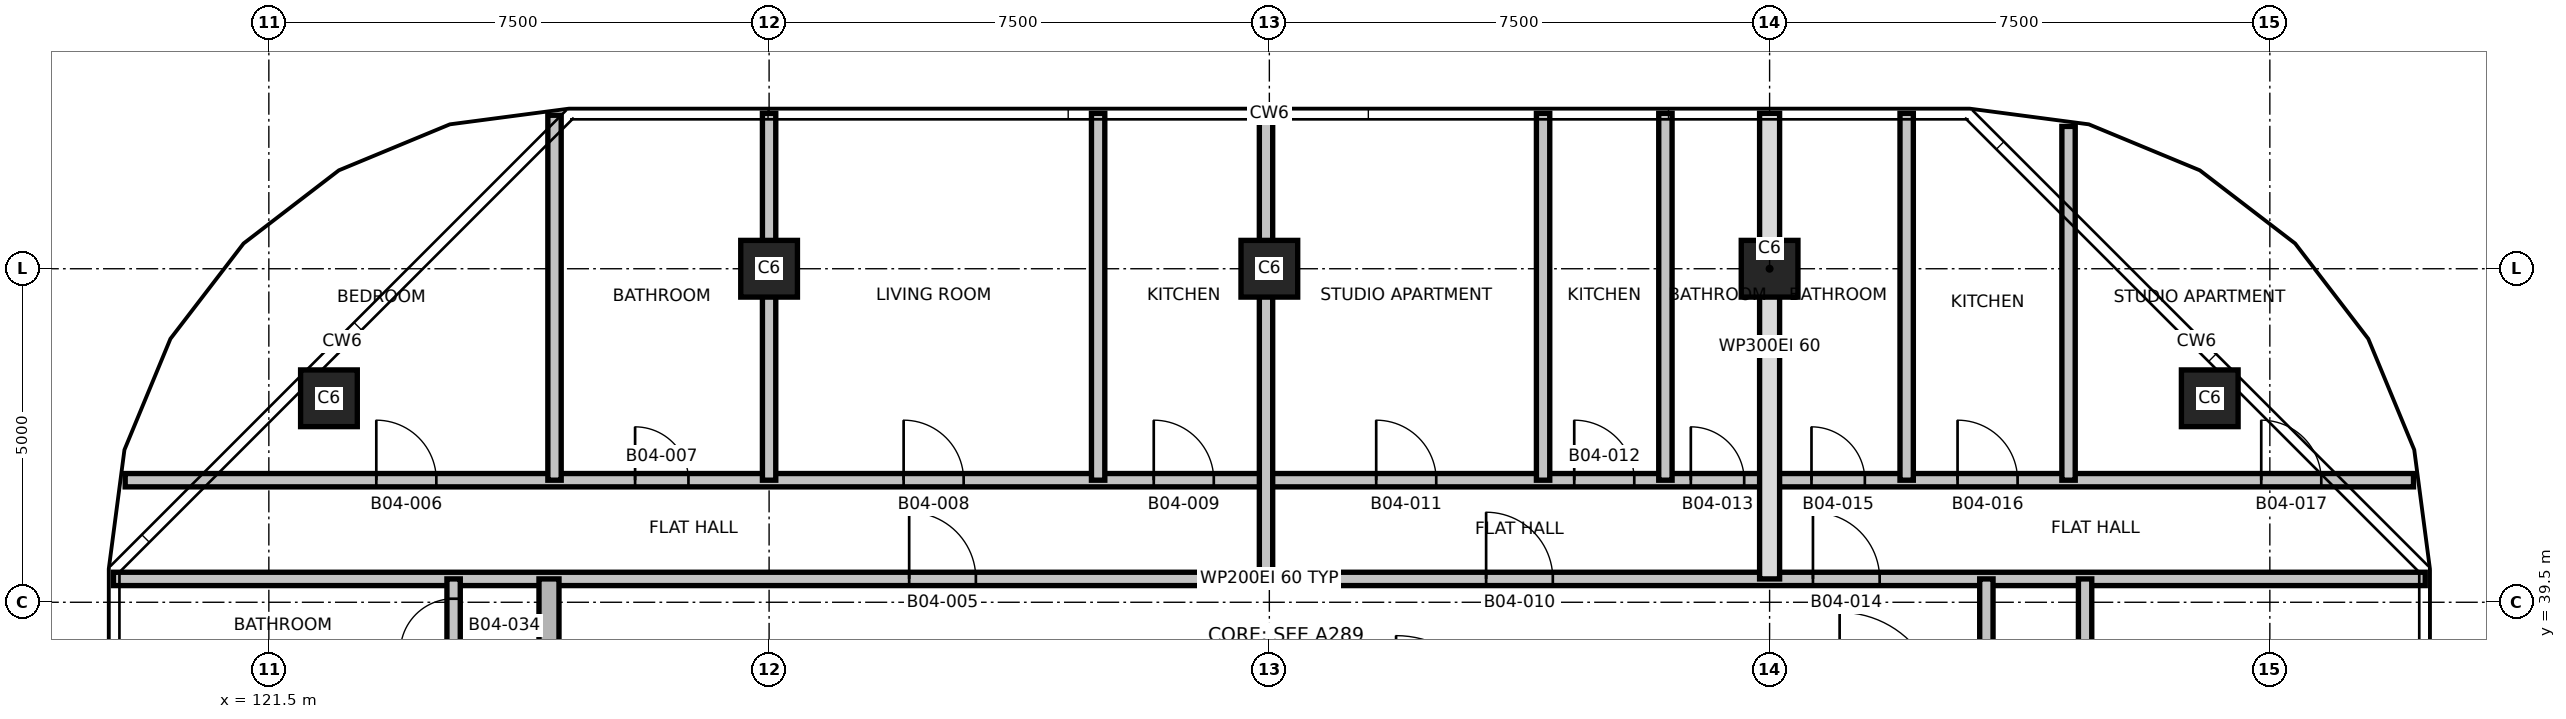
"""IFC4 building model, lengths in metres.
Left out: names, types, materials, properties, quantities, classifications, styles, units other than length and angle.
Written with IfcOpenShell. Run it as: python <this file> out.ifc"""

import sys

from ifc_helpers import new_model, si_unit, direction, frame, frame_2d, origin, origin_2d, place, context, subcontext, project, spatial, rectangle, extrude, element, fill, save


model = new_model("IFC4")
c1 = context("Model", 3, precision=1e-05, world=origin(), true_north=direction((0.0, 1.0)))
c2 = subcontext(c1, "Body", "Model", "MODEL_VIEW")
j1 = project(units=[si_unit("LENGTHUNIT", "METRE"), si_unit("PLANEANGLEUNIT", "RADIAN")], contexts=[c1])
p1 = place(None, origin())
s1 = spatial("IfcSite", under=j1, at=p1, CompositionType="ELEMENT")
p2 = place(p1, origin())
s2 = spatial("IfcBuilding", under=s1, at=p2, CompositionType="ELEMENT")
p3 = place(p2, frame((0.0, 0.0, 66.8)))
s3 = spatial("IfcBuildingStorey", under=s2, at=p3, CompositionType="ELEMENT", Elevation=66.8)
for number, where, z_axis, x_axis in (
    (1, (122.401, 42.558, 0.0), (0.0, 0.0, 1.0), (1.0, 0.0, 0.0)),
    (2, (150.599, 42.558, 0.0), (0.0, 0.0, 1.0), (1.0, 0.0, 0.0)),
    (3, (129.0, 44.5, 0.0), (0.0, 0.0, 1.0), (1.0, 0.0, 0.0)),
    (4, (136.5, 44.5, 0.0), (0.0, 0.0, 1.0), (1.0, 0.0, 0.0)),
    (5, (144.0, 44.5, 0.0), (0.0, 0.0, 1.0), (1.0, 0.0, 0.0)),
):
    element("IfcColumn", number, at=place(p3, frame(where, z_axis=z_axis, x_axis=x_axis)), inside=s3, PredefinedType="COLUMN", context=c2, shape_type="SweptSolid", body=[
        extrude(rectangle(XDim=0.85, YDim=0.85, at=origin_2d()), origin(), (0.0, 0.0, 1.0), 3.7),
    ])
p4 = place(p3, frame((119.17, 39.85, 0.0), z_axis=(0.0, 0.0, 1.0), x_axis=(1.0, 0.0, 0.0)))
e6 = element("IfcWall", 6, at=p4, inside=s3, PredefinedType="PARTITIONING", context=c2, shape_type="SweptSolid", body=[
    extrude(rectangle(XDim=34.66, YDim=0.2, at=frame_2d((17.33, 0.0))), origin(), (0.0, 0.0, 1.0), 3.4),
])
p5 = place(p4, frame((11.93, 0.0, 0.0)))
e7 = element("IfcOpeningElement", 7, at=p5, cuts=e6, PredefinedType="OPENING", context=c2, shape_type="SweptSolid", body=[
    extrude(rectangle(XDim=1.0, YDim=2.1, at=frame_2d((0.5, 1.05))), frame((0.0, 0.11, 0.0), z_axis=(0.0, -1.0, 0.0), x_axis=(1.0, 0.0, 0.0)), (0.0, 0.0, 1.0), 0.22),
])
p6 = place(p4, frame((20.58, 0.0, 0.0)))
e8 = element("IfcOpeningElement", 8, at=p6, cuts=e6, PredefinedType="OPENING", context=c2, shape_type="SweptSolid", body=[
    extrude(rectangle(XDim=1.0, YDim=2.1, at=frame_2d((0.5, 1.05))), frame((0.0, 0.11, 0.0), z_axis=(0.0, -1.0, 0.0), x_axis=(1.0, 0.0, 0.0)), (0.0, 0.0, 1.0), 0.22),
])
p7 = place(p4, frame((25.48, 0.0, 0.0)))
e9 = element("IfcOpeningElement", 9, at=p7, cuts=e6, PredefinedType="OPENING", context=c2, shape_type="SweptSolid", body=[
    extrude(rectangle(XDim=1.0, YDim=2.1, at=frame_2d((0.5, 1.05))), frame((0.0, 0.11, 0.0), z_axis=(0.0, -1.0, 0.0), x_axis=(1.0, 0.0, 0.0)), (0.0, 0.0, 1.0), 0.22),
])
p8 = place(p3, frame((119.346, 41.33, 0.0), z_axis=(0.0, 0.0, 1.0), x_axis=(1.0, 0.0, 0.0)))
e10 = element("IfcWall", 10, at=p8, inside=s3, PredefinedType="PARTITIONING", context=c2, shape_type="SweptSolid", body=[
    extrude(rectangle(XDim=34.308, YDim=0.2, at=frame_2d((17.154, 0.0))), origin(), (0.0, 0.0, 1.0), 3.4),
])
p9 = place(p8, frame((3.765, 0.0, 0.0)))
e11 = element("IfcOpeningElement", 11, at=p9, cuts=e10, PredefinedType="OPENING", context=c2, shape_type="SweptSolid", body=[
    extrude(rectangle(XDim=0.9, YDim=2.1, at=frame_2d((0.45, 1.05))), frame((0.0, 0.11, 0.0), z_axis=(0.0, -1.0, 0.0), x_axis=(1.0, 0.0, 0.0)), (0.0, 0.0, 1.0), 0.22),
])
p10 = place(p8, frame((7.645, 0.0, 0.0)))
e12 = element("IfcOpeningElement", 12, at=p10, cuts=e10, PredefinedType="OPENING", context=c2, shape_type="SweptSolid", body=[
    extrude(rectangle(XDim=0.8, YDim=2.1, at=frame_2d((0.4, 1.05))), frame((0.0, 0.11, 0.0), z_axis=(0.0, -1.0, 0.0), x_axis=(1.0, 0.0, 0.0)), (0.0, 0.0, 1.0), 0.22),
])
p11 = place(p8, frame((11.671, 0.0, 0.0)))
e13 = element("IfcOpeningElement", 13, at=p11, cuts=e10, PredefinedType="OPENING", context=c2, shape_type="SweptSolid", body=[
    extrude(rectangle(XDim=0.9, YDim=2.1, at=frame_2d((0.45, 1.05))), frame((0.0, 0.11, 0.0), z_axis=(0.0, -1.0, 0.0), x_axis=(1.0, 0.0, 0.0)), (0.0, 0.0, 1.0), 0.22),
])
p12 = place(p8, frame((15.421, 0.0, 0.0)))
e14 = element("IfcOpeningElement", 14, at=p12, cuts=e10, PredefinedType="OPENING", context=c2, shape_type="SweptSolid", body=[
    extrude(rectangle(XDim=0.9, YDim=2.1, at=frame_2d((0.45, 1.05))), frame((0.0, 0.11, 0.0), z_axis=(0.0, -1.0, 0.0), x_axis=(1.0, 0.0, 0.0)), (0.0, 0.0, 1.0), 0.22),
])
p13 = place(p8, frame((18.756, 0.0, 0.0)))
e15 = element("IfcOpeningElement", 15, at=p13, cuts=e10, PredefinedType="OPENING", context=c2, shape_type="SweptSolid", body=[
    extrude(rectangle(XDim=0.9, YDim=2.1, at=frame_2d((0.45, 1.05))), frame((0.0, 0.11, 0.0), z_axis=(0.0, -1.0, 0.0), x_axis=(1.0, 0.0, 0.0)), (0.0, 0.0, 1.0), 0.22),
])
p14 = place(p8, frame((21.725, 0.0, 0.0)))
e16 = element("IfcOpeningElement", 16, at=p14, cuts=e10, PredefinedType="OPENING", context=c2, shape_type="SweptSolid", body=[
    extrude(rectangle(XDim=0.9, YDim=2.1, at=frame_2d((0.45, 1.05))), frame((0.0, 0.11, 0.0), z_axis=(0.0, -1.0, 0.0), x_axis=(1.0, 0.0, 0.0)), (0.0, 0.0, 1.0), 0.22),
])
p15 = place(p8, frame((23.473, 0.0, 0.0)))
e17 = element("IfcOpeningElement", 17, at=p15, cuts=e10, PredefinedType="OPENING", context=c2, shape_type="SweptSolid", body=[
    extrude(rectangle(XDim=0.8, YDim=2.1, at=frame_2d((0.4, 1.05))), frame((0.0, 0.11, 0.0), z_axis=(0.0, -1.0, 0.0), x_axis=(1.0, 0.0, 0.0)), (0.0, 0.0, 1.0), 0.22),
])
p16 = place(p8, frame((25.282, 0.0, 0.0)))
e18 = element("IfcOpeningElement", 18, at=p16, cuts=e10, PredefinedType="OPENING", context=c2, shape_type="SweptSolid", body=[
    extrude(rectangle(XDim=0.8, YDim=2.1, at=frame_2d((0.4, 1.05))), frame((0.0, 0.11, 0.0), z_axis=(0.0, -1.0, 0.0), x_axis=(1.0, 0.0, 0.0)), (0.0, 0.0, 1.0), 0.22),
])
p17 = place(p8, frame((27.472, 0.0, 0.0)))
e19 = element("IfcOpeningElement", 19, at=p17, cuts=e10, PredefinedType="OPENING", context=c2, shape_type="SweptSolid", body=[
    extrude(rectangle(XDim=0.9, YDim=2.1, at=frame_2d((0.45, 1.05))), frame((0.0, 0.11, 0.0), z_axis=(0.0, -1.0, 0.0), x_axis=(1.0, 0.0, 0.0)), (0.0, 0.0, 1.0), 0.22),
])
p18 = place(p8, frame((32.025, 0.0, 0.0)))
e20 = element("IfcOpeningElement", 20, at=p18, cuts=e10, PredefinedType="OPENING", context=c2, shape_type="SweptSolid", body=[
    extrude(rectangle(XDim=0.9, YDim=2.1, at=frame_2d((0.45, 1.05))), frame((0.0, 0.11, 0.0), z_axis=(0.0, -1.0, 0.0), x_axis=(1.0, 0.0, 0.0)), (0.0, 0.0, 1.0), 0.22),
])
p19 = place(p3, frame((124.27, 22.15, 0.0), z_axis=(0.0, 0.0, 1.0), x_axis=(0.0, 1.0, 0.0)))
e21 = element("IfcWall", 21, at=p19, inside=s3, PredefinedType="PARTITIONING", context=c2, shape_type="SweptSolid", body=[
    extrude(rectangle(XDim=17.7, YDim=0.2, at=frame_2d((8.85, 0.0))), origin(), (0.0, 0.0, 1.0), 3.4),
])
p20 = place(p19, frame((1.725, 0.0, 0.0)))
e22 = element("IfcOpeningElement", 22, at=p20, cuts=e21, PredefinedType="OPENING", context=c2, shape_type="SweptSolid", body=[
    extrude(rectangle(XDim=0.9, YDim=2.1, at=frame_2d((0.45, 1.05))), frame((0.0, 0.11, 0.0), z_axis=(0.0, -1.0, 0.0), x_axis=(1.0, 0.0, 0.0)), (0.0, 0.0, 1.0), 0.22),
])
p21 = place(p19, frame((6.867, 0.0, 0.0)))
e23 = element("IfcOpeningElement", 23, at=p21, cuts=e21, PredefinedType="OPENING", context=c2, shape_type="SweptSolid", body=[
    extrude(rectangle(XDim=0.9, YDim=2.1, at=frame_2d((0.45, 1.05))), frame((0.0, 0.11, 0.0), z_axis=(0.0, -1.0, 0.0), x_axis=(1.0, 0.0, 0.0)), (0.0, 0.0, 1.0), 0.22),
])
p22 = place(p19, frame((11.367, 0.0, 0.0)))
e24 = element("IfcOpeningElement", 24, at=p22, cuts=e21, PredefinedType="OPENING", context=c2, shape_type="SweptSolid", body=[
    extrude(rectangle(XDim=0.9, YDim=2.1, at=frame_2d((0.45, 1.05))), frame((0.0, 0.11, 0.0), z_axis=(0.0, -1.0, 0.0), x_axis=(1.0, 0.0, 0.0)), (0.0, 0.0, 1.0), 0.22),
])
p23 = place(p19, frame((14.378, 0.0, 0.0)))
e25 = element("IfcOpeningElement", 25, at=p23, cuts=e21, PredefinedType="OPENING", context=c2, shape_type="SweptSolid", body=[
    extrude(rectangle(XDim=0.9, YDim=2.1, at=frame_2d((0.45, 1.05))), frame((0.0, 0.11, 0.0), z_axis=(0.0, -1.0, 0.0), x_axis=(1.0, 0.0, 0.0)), (0.0, 0.0, 1.0), 0.22),
])
p24 = place(p19, frame((16.603, 0.0, 0.0)))
e26 = element("IfcOpeningElement", 26, at=p24, cuts=e21, PredefinedType="OPENING", context=c2, shape_type="SweptSolid", body=[
    extrude(rectangle(XDim=0.8, YDim=2.1, at=frame_2d((0.4, 1.05))), frame((0.0, 0.11, 0.0), z_axis=(0.0, -1.0, 0.0), x_axis=(1.0, 0.0, 0.0)), (0.0, 0.0, 1.0), 0.22),
])
p25 = place(p3, frame((125.7, 22.15, 0.0), z_axis=(0.0, 0.0, 1.0), x_axis=(0.0, 1.0, 0.0)))
e27 = element("IfcWall", 27, at=p25, inside=s3, PredefinedType="SHEAR", context=c2, shape_type="SweptSolid", body=[
    extrude(rectangle(XDim=17.7, YDim=0.3, at=frame_2d((8.85, 0.0))), origin(), (0.0, 0.0, 1.0), 3.4),
])
p26 = place(p25, frame((2.7, 0.0, 0.0)))
e28 = element("IfcOpeningElement", 28, at=p26, cuts=e27, PredefinedType="OPENING", context=c2, shape_type="SweptSolid", body=[
    extrude(rectangle(XDim=1.0, YDim=2.1, at=frame_2d((0.5, 1.05))), frame((0.0, 0.16, 0.0), z_axis=(0.0, -1.0, 0.0), x_axis=(1.0, 0.0, 0.0)), (0.0, 0.0, 1.0), 0.32),
])
p27 = place(p3, frame((125.783, 41.33, 0.0), z_axis=(0.0, 0.0, 1.0), x_axis=(0.0, 1.0, 0.0)))
e29 = element("IfcWall", 29, at=p27, inside=s3, PredefinedType="PARTITIONING", context=c2, shape_type="SweptSolid", body=[
    extrude(rectangle(XDim=5.471, YDim=0.2, at=frame_2d((2.735, 0.0))), origin(), (0.0, 0.0, 1.0), 3.4),
])
for number, where, z_axis, x_axis in (
    (30, (129.0, 41.33, 0.0), (0.0, 0.0, 1.0), (0.0, 1.0, 0.0)),
    (31, (133.933, 41.33, 0.0), (0.0, 0.0, 1.0), (0.0, 1.0, 0.0)),
):
    element("IfcWall", number, at=place(p3, frame(where, z_axis=z_axis, x_axis=x_axis)), inside=s3, PredefinedType="PARTITIONING", context=c2, shape_type="SweptSolid", body=[
        extrude(rectangle(XDim=5.5, YDim=0.2, at=frame_2d((2.75, 0.0))), origin(), (0.0, 0.0, 1.0), 3.4),
    ])
p28 = place(p3, frame((136.45, 39.85, 0.0), z_axis=(0.0, 0.0, 1.0), x_axis=(0.0, 1.0, 0.0)))
e32 = element("IfcWall", 32, at=p28, inside=s3, PredefinedType="PARTITIONING", context=c2, shape_type="SweptSolid", body=[
    extrude(rectangle(XDim=6.98, YDim=0.2, at=frame_2d((3.49, 0.0))), origin(), (0.0, 0.0, 1.0), 3.4),
])
for number, where, z_axis, x_axis in (
    (33, (140.604, 41.33, 0.0), (0.0, 0.0, 1.0), (0.0, 1.0, 0.0)),
    (34, (142.438, 41.33, 0.0), (0.0, 0.0, 1.0), (0.0, 1.0, 0.0)),
):
    element("IfcWall", number, at=place(p3, frame(where, z_axis=z_axis, x_axis=x_axis)), inside=s3, PredefinedType="PARTITIONING", context=c2, shape_type="SweptSolid", body=[
        extrude(rectangle(XDim=5.5, YDim=0.2, at=frame_2d((2.75, 0.0))), origin(), (0.0, 0.0, 1.0), 3.4),
    ])
p29 = place(p3, frame((144.0, 39.85, 0.0), z_axis=(0.0, 0.0, 1.0), x_axis=(0.0, 1.0, 0.0)))
e35 = element("IfcWall", 35, at=p29, inside=s3, PredefinedType="PARTITIONING", context=c2, shape_type="SweptSolid", body=[
    extrude(rectangle(XDim=6.98, YDim=0.3, at=frame_2d((3.49, 0.0))), origin(), (0.0, 0.0, 1.0), 3.4),
])
p30 = place(p3, frame((146.055, 41.33, 0.0), z_axis=(0.0, 0.0, 1.0), x_axis=(0.0, 1.0, 0.0)))
e36 = element("IfcWall", 36, at=p30, inside=s3, PredefinedType="PARTITIONING", context=c2, shape_type="SweptSolid", body=[
    extrude(rectangle(XDim=5.5, YDim=0.2, at=frame_2d((2.75, 0.0))), origin(), (0.0, 0.0, 1.0), 3.4),
])
p31 = place(p3, frame((147.25, 22.15, 0.0), z_axis=(0.0, 0.0, 1.0), x_axis=(0.0, 1.0, 0.0)))
e37 = element("IfcWall", 37, at=p31, inside=s3, PredefinedType="PARTITIONING", context=c2, shape_type="SweptSolid", body=[
    extrude(rectangle(XDim=17.7, YDim=0.2, at=frame_2d((8.85, 0.0))), origin(), (0.0, 0.0, 1.0), 3.4),
])
p32 = place(p31, frame((2.65, 0.0, 0.0)))
e38 = element("IfcOpeningElement", 38, at=p32, cuts=e37, PredefinedType="OPENING", context=c2, shape_type="SweptSolid", body=[
    extrude(rectangle(XDim=1.0, YDim=2.1, at=frame_2d((0.5, 1.05))), frame((0.0, 0.11, 0.0), z_axis=(0.0, -1.0, 0.0), x_axis=(1.0, 0.0, 0.0)), (0.0, 0.0, 1.0), 0.22),
])
p33 = place(p3, frame((148.482, 41.33, 0.0), z_axis=(0.0, 0.0, 1.0), x_axis=(0.0, 1.0, 0.0)))
e39 = element("IfcWall", 39, at=p33, inside=s3, PredefinedType="PARTITIONING", context=c2, shape_type="SweptSolid", body=[
    extrude(rectangle(XDim=5.304, YDim=0.2, at=frame_2d((2.652, 0.0))), origin(), (0.0, 0.0, 1.0), 3.4),
])
p34 = place(p3, frame((148.73, 22.15, 0.0), z_axis=(0.0, 0.0, 1.0), x_axis=(0.0, 1.0, 0.0)))
e40 = element("IfcWall", 40, at=p34, inside=s3, PredefinedType="PARTITIONING", context=c2, shape_type="SweptSolid", body=[
    extrude(rectangle(XDim=17.7, YDim=0.2, at=frame_2d((8.85, 0.0))), origin(), (0.0, 0.0, 1.0), 3.4),
])
p35 = place(p34, frame((1.028, 0.0, 0.0)))
e41 = element("IfcOpeningElement", 41, at=p35, cuts=e40, PredefinedType="OPENING", context=c2, shape_type="SweptSolid", body=[
    extrude(rectangle(XDim=0.9, YDim=2.1, at=frame_2d((0.45, 1.05))), frame((0.0, 0.11, 0.0), z_axis=(0.0, -1.0, 0.0), x_axis=(1.0, 0.0, 0.0)), (0.0, 0.0, 1.0), 0.22),
])
p36 = place(p34, frame((3.253, 0.0, 0.0)))
e42 = element("IfcOpeningElement", 42, at=p36, cuts=e40, PredefinedType="OPENING", context=c2, shape_type="SweptSolid", body=[
    extrude(rectangle(XDim=0.8, YDim=2.1, at=frame_2d((0.4, 1.05))), frame((0.0, 0.11, 0.0), z_axis=(0.0, -1.0, 0.0), x_axis=(1.0, 0.0, 0.0)), (0.0, 0.0, 1.0), 0.22),
])
p37 = place(p34, frame((6.195, 0.0, 0.0)))
e43 = element("IfcOpeningElement", 43, at=p37, cuts=e40, PredefinedType="OPENING", context=c2, shape_type="SweptSolid", body=[
    extrude(rectangle(XDim=0.9, YDim=2.1, at=frame_2d((0.45, 1.05))), frame((0.0, 0.11, 0.0), z_axis=(0.0, -1.0, 0.0), x_axis=(1.0, 0.0, 0.0)), (0.0, 0.0, 1.0), 0.22),
])
p38 = place(p34, frame((9.641, 0.0, 0.0)))
e44 = element("IfcOpeningElement", 44, at=p38, cuts=e40, PredefinedType="OPENING", context=c2, shape_type="SweptSolid", body=[
    extrude(rectangle(XDim=0.9, YDim=2.1, at=frame_2d((0.45, 1.05))), frame((0.0, 0.11, 0.0), z_axis=(0.0, -1.0, 0.0), x_axis=(1.0, 0.0, 0.0)), (0.0, 0.0, 1.0), 0.22),
])
p39 = place(p34, frame((11.895, 0.0, 0.0)))
e45 = element("IfcOpeningElement", 45, at=p39, cuts=e40, PredefinedType="OPENING", context=c2, shape_type="SweptSolid", body=[
    extrude(rectangle(XDim=0.8, YDim=2.1, at=frame_2d((0.4, 1.05))), frame((0.0, 0.11, 0.0), z_axis=(0.0, -1.0, 0.0), x_axis=(1.0, 0.0, 0.0)), (0.0, 0.0, 1.0), 0.22),
])
p40 = place(p34, frame((15.075, 0.0, 0.0)))
e46 = element("IfcOpeningElement", 46, at=p40, cuts=e40, PredefinedType="OPENING", context=c2, shape_type="SweptSolid", body=[
    extrude(rectangle(XDim=0.9, YDim=2.1, at=frame_2d((0.45, 1.05))), frame((0.0, 0.11, 0.0), z_axis=(0.0, -1.0, 0.0), x_axis=(1.0, 0.0, 0.0)), (0.0, 0.0, 1.0), 0.22),
])
p41 = place(p5, origin())
e47 = element("IfcDoor", 47, at=p41, inside=s3, OperationType="SINGLE_SWING_LEFT", PredefinedType="DOOR", context=c2, shape_type="SweptSolid", body=[
    extrude(rectangle(XDim=1.0, YDim=2.1, at=frame_2d((0.5, 1.05))), frame((0.0, 0.025, 0.0), z_axis=(0.0, -1.0, 0.0), x_axis=(1.0, 0.0, 0.0)), (0.0, 0.0, 1.0), 0.05),
])
fill(e7, e47)
p42 = place(p9, origin())
e48 = element("IfcDoor", 48, at=p42, inside=s3, OperationType="SINGLE_SWING_RIGHT", PredefinedType="DOOR", context=c2, shape_type="SweptSolid", body=[
    extrude(rectangle(XDim=0.9, YDim=2.1, at=frame_2d((0.45, 1.05))), frame((0.0, 0.025, 0.0), z_axis=(0.0, -1.0, 0.0), x_axis=(1.0, 0.0, 0.0)), (0.0, 0.0, 1.0), 0.05),
])
fill(e11, e48)
p43 = place(p10, origin())
e49 = element("IfcDoor", 49, at=p43, inside=s3, OperationType="SINGLE_SWING_LEFT", PredefinedType="DOOR", context=c2, shape_type="SweptSolid", body=[
    extrude(rectangle(XDim=0.8, YDim=2.1, at=frame_2d((0.4, 1.05))), frame((0.0, 0.025, 0.0), z_axis=(0.0, -1.0, 0.0), x_axis=(1.0, 0.0, 0.0)), (0.0, 0.0, 1.0), 0.05),
])
fill(e12, e49)
p44 = place(p11, origin())
e50 = element("IfcDoor", 50, at=p44, inside=s3, OperationType="SINGLE_SWING_RIGHT", PredefinedType="DOOR", context=c2, shape_type="SweptSolid", body=[
    extrude(rectangle(XDim=0.9, YDim=2.1, at=frame_2d((0.45, 1.05))), frame((0.0, 0.025, 0.0), z_axis=(0.0, -1.0, 0.0), x_axis=(1.0, 0.0, 0.0)), (0.0, 0.0, 1.0), 0.05),
])
fill(e13, e50)
p45 = place(p12, origin())
e51 = element("IfcDoor", 51, at=p45, inside=s3, OperationType="SINGLE_SWING_LEFT", PredefinedType="DOOR", context=c2, shape_type="SweptSolid", body=[
    extrude(rectangle(XDim=0.9, YDim=2.1, at=frame_2d((0.45, 1.05))), frame((0.0, 0.025, 0.0), z_axis=(0.0, -1.0, 0.0), x_axis=(1.0, 0.0, 0.0)), (0.0, 0.0, 1.0), 0.05),
])
fill(e14, e51)
p46 = place(p6, origin())
e52 = element("IfcDoor", 52, at=p46, inside=s3, OperationType="SINGLE_SWING_RIGHT", PredefinedType="DOOR", context=c2, shape_type="SweptSolid", body=[
    extrude(rectangle(XDim=1.0, YDim=2.1, at=frame_2d((0.5, 1.05))), frame((0.0, 0.025, 0.0), z_axis=(0.0, -1.0, 0.0), x_axis=(1.0, 0.0, 0.0)), (0.0, 0.0, 1.0), 0.05),
])
fill(e8, e52)
p47 = place(p13, origin())
e53 = element("IfcDoor", 53, at=p47, inside=s3, OperationType="SINGLE_SWING_LEFT", PredefinedType="DOOR", context=c2, shape_type="SweptSolid", body=[
    extrude(rectangle(XDim=0.9, YDim=2.1, at=frame_2d((0.45, 1.05))), frame((0.0, 0.025, 0.0), z_axis=(0.0, -1.0, 0.0), x_axis=(1.0, 0.0, 0.0)), (0.0, 0.0, 1.0), 0.05),
])
fill(e15, e53)
p48 = place(p14, origin())
e54 = element("IfcDoor", 54, at=p48, inside=s3, OperationType="SINGLE_SWING_RIGHT", PredefinedType="DOOR", context=c2, shape_type="SweptSolid", body=[
    extrude(rectangle(XDim=0.9, YDim=2.1, at=frame_2d((0.45, 1.05))), frame((0.0, 0.025, 0.0), z_axis=(0.0, -1.0, 0.0), x_axis=(1.0, 0.0, 0.0)), (0.0, 0.0, 1.0), 0.05),
])
fill(e16, e54)
p49 = place(p15, origin())
e55 = element("IfcDoor", 55, at=p49, inside=s3, OperationType="SINGLE_SWING_LEFT", PredefinedType="DOOR", context=c2, shape_type="SweptSolid", body=[
    extrude(rectangle(XDim=0.8, YDim=2.1, at=frame_2d((0.4, 1.05))), frame((0.0, 0.025, 0.0), z_axis=(0.0, -1.0, 0.0), x_axis=(1.0, 0.0, 0.0)), (0.0, 0.0, 1.0), 0.05),
])
fill(e17, e55)
p50 = place(p7, origin())
e56 = element("IfcDoor", 56, at=p50, inside=s3, OperationType="SINGLE_SWING_RIGHT", PredefinedType="DOOR", context=c2, shape_type="SweptSolid", body=[
    extrude(rectangle(XDim=1.0, YDim=2.1, at=frame_2d((0.5, 1.05))), frame((0.0, 0.025, 0.0), z_axis=(0.0, -1.0, 0.0), x_axis=(1.0, 0.0, 0.0)), (0.0, 0.0, 1.0), 0.05),
])
fill(e9, e56)
p51 = place(p16, origin())
e57 = element("IfcDoor", 57, at=p51, inside=s3, OperationType="SINGLE_SWING_LEFT", PredefinedType="DOOR", context=c2, shape_type="SweptSolid", body=[
    extrude(rectangle(XDim=0.8, YDim=2.1, at=frame_2d((0.4, 1.05))), frame((0.0, 0.025, 0.0), z_axis=(0.0, -1.0, 0.0), x_axis=(1.0, 0.0, 0.0)), (0.0, 0.0, 1.0), 0.05),
])
fill(e18, e57)
p52 = place(p17, origin())
e58 = element("IfcDoor", 58, at=p52, inside=s3, OperationType="SINGLE_SWING_RIGHT", PredefinedType="DOOR", context=c2, shape_type="SweptSolid", body=[
    extrude(rectangle(XDim=0.9, YDim=2.1, at=frame_2d((0.45, 1.05))), frame((0.0, 0.025, 0.0), z_axis=(0.0, -1.0, 0.0), x_axis=(1.0, 0.0, 0.0)), (0.0, 0.0, 1.0), 0.05),
])
fill(e19, e58)
p53 = place(p18, origin())
e59 = element("IfcDoor", 59, at=p53, inside=s3, OperationType="SINGLE_SWING_LEFT", PredefinedType="DOOR", context=c2, shape_type="SweptSolid", body=[
    extrude(rectangle(XDim=0.9, YDim=2.1, at=frame_2d((0.45, 1.05))), frame((0.0, 0.025, 0.0), z_axis=(0.0, -1.0, 0.0), x_axis=(1.0, 0.0, 0.0)), (0.0, 0.0, 1.0), 0.05),
])
fill(e20, e59)
p54 = place(p24, origin())
e60 = element("IfcDoor", 60, at=p54, inside=s3, OperationType="SINGLE_SWING_RIGHT", PredefinedType="DOOR", context=c2, shape_type="SweptSolid", body=[
    extrude(rectangle(XDim=0.8, YDim=2.1, at=frame_2d((0.4, 1.05))), frame((0.0, 0.025, 0.0), z_axis=(0.0, -1.0, 0.0), x_axis=(1.0, 0.0, 0.0)), (0.0, 0.0, 1.0), 0.05),
])
fill(e26, e60)
save(model, sys.argv[1])
